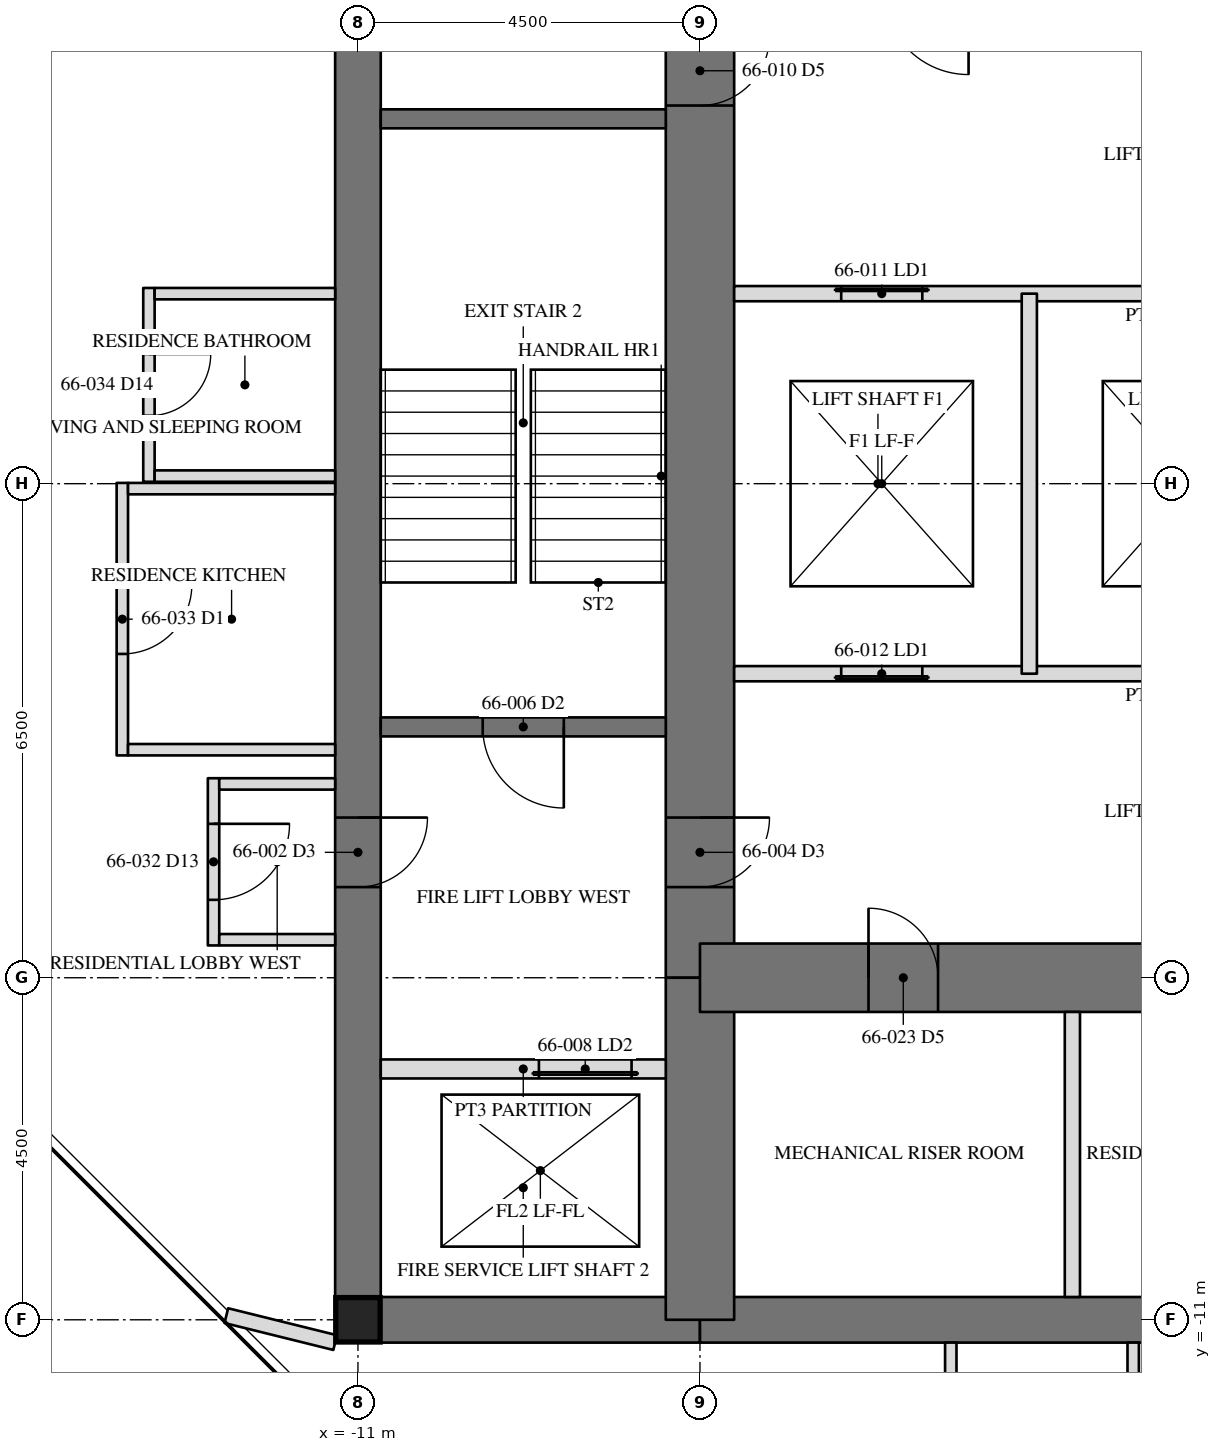
"""IFC4 building model, lengths in metres.
Left out: names, types, materials, properties, quantities, classifications, styles, units other than length and angle.
Written with IfcOpenShell. Run it as: python <this file> out.ifc"""

import sys

from ifc_helpers import new_model, si_unit, direction, frame, frame_2d, origin, origin_2d, place, context, subcontext, project, spatial, rectangle, hollow_rectangle, extrude, element, fill, save


model = new_model("IFC4")
c1 = context("Model", 3, precision=1e-05, world=origin(), true_north=direction((0.0, 1.0)))
c2 = subcontext(c1, "Body", "Model", "MODEL_VIEW")
j1 = project(units=[si_unit("LENGTHUNIT", "METRE"), si_unit("PLANEANGLEUNIT", "RADIAN")], contexts=[c1])
p1 = place(None, origin())
s1 = spatial("IfcSite", under=j1, at=p1, CompositionType="ELEMENT")
p2 = place(p1, origin())
s2 = spatial("IfcBuilding", under=s1, at=p2, CompositionType="ELEMENT")
p3 = place(p2, frame((0.0, 0.0, 270.4)))
s3 = spatial("IfcBuildingStorey", under=s2, at=p3, CompositionType="ELEMENT", Elevation=270.4)
p4 = place(p3, frame((-11.0, 11.0, 0.0), z_axis=(0.0, 0.0, 1.0), x_axis=(0.0, -1.0, 0.0)))
e1 = element("IfcWall", 1, at=p4, inside=s3, PredefinedType="SHEAR", context=c2, shape_type="SweptSolid", body=[
    extrude(rectangle(XDim=22.0, YDim=0.6, at=frame_2d((11.0, 0.0))), origin(), (0.0, 0.0, 1.0), 3.6),
])
p5 = place(p4, frame((15.393, 0.0, 0.0)))
e2 = element("IfcOpeningElement", 2, at=p5, cuts=e1, PredefinedType="OPENING", context=c2, shape_type="SweptSolid", body=[
    extrude(rectangle(XDim=0.915, YDim=2.134, at=frame_2d((0.458, 1.067))), frame((0.0, 0.31, 0.0), z_axis=(0.0, -1.0, 0.0), x_axis=(1.0, 0.0, 0.0)), (0.0, 0.0, 1.0), 0.62),
])
p6 = place(p3, frame((-11.0, -11.0, 0.0), z_axis=(0.0, 0.0, 1.0), x_axis=(1.0, 0.0, 0.0)))
e3 = element("IfcWall", 3, at=p6, inside=s3, PredefinedType="SHEAR", context=c2, shape_type="SweptSolid", body=[
    extrude(rectangle(XDim=4.5, YDim=0.6, at=frame_2d((2.25, 0.0))), origin(), (0.0, 0.0, 1.0), 3.6),
])
p7 = place(p3, frame((-6.5, -11.0, 0.0), z_axis=(0.0, 0.0, 1.0), x_axis=(1.0, 0.0, 0.0)))
e4 = element("IfcWall", 4, at=p7, inside=s3, PredefinedType="SHEAR", context=c2, shape_type="SweptSolid", body=[
    extrude(rectangle(XDim=13.0, YDim=0.6, at=frame_2d((6.5, 0.0))), origin(), (0.0, 0.0, 1.0), 3.6),
])
p8 = place(p7, frame((6.0, 0.0, 0.0)))
e5 = element("IfcOpeningElement", 5, at=p8, cuts=e4, PredefinedType="OPENING", context=c2, shape_type="SweptSolid", body=[
    extrude(rectangle(XDim=1.0, YDim=2.134, at=frame_2d((0.5, 1.067))), frame((0.0, 0.31, 0.0), z_axis=(0.0, -1.0, 0.0), x_axis=(1.0, 0.0, 0.0)), (0.0, 0.0, 1.0), 0.62),
])
p9 = place(p3, frame((-6.5, 6.5, 0.0), z_axis=(0.0, 0.0, 1.0), x_axis=(0.0, -1.0, 0.0)))
e6 = element("IfcWall", 6, at=p9, inside=s3, PredefinedType="SHEAR", context=c2, shape_type="SweptSolid", body=[
    extrude(rectangle(XDim=13.0, YDim=0.9, at=frame_2d((6.5, 0.0))), origin(), (0.0, 0.0, 1.0), 3.6),
])
p10 = place(p9, frame((10.893, 0.0, 0.0)))
e7 = element("IfcOpeningElement", 7, at=p10, cuts=e6, PredefinedType="OPENING", context=c2, shape_type="SweptSolid", body=[
    extrude(rectangle(XDim=0.915, YDim=2.134, at=frame_2d((0.458, 1.067))), frame((0.0, 0.46, 0.0), z_axis=(0.0, -1.0, 0.0), x_axis=(1.0, 0.0, 0.0)), (0.0, 0.0, 1.0), 0.92),
])
p11 = place(p9, frame((0.61, 0.0, 0.0)))
e8 = element("IfcOpeningElement", 8, at=p11, cuts=e6, PredefinedType="OPENING", context=c2, shape_type="SweptSolid", body=[
    extrude(rectangle(XDim=0.915, YDim=2.134, at=frame_2d((0.458, 1.067))), frame((0.0, 0.46, 0.0), z_axis=(0.0, -1.0, 0.0), x_axis=(1.0, 0.0, 0.0)), (0.0, 0.0, 1.0), 0.92),
])
p12 = place(p3, frame((-6.5, -6.5, 0.0), z_axis=(0.0, 0.0, 1.0), x_axis=(0.0, -1.0, 0.0)))
e9 = element("IfcWall", 9, at=p12, inside=s3, PredefinedType="SHEAR", context=c2, shape_type="SweptSolid", body=[
    extrude(rectangle(XDim=4.5, YDim=0.9, at=frame_2d((2.25, 0.0))), origin(), (0.0, 0.0, 1.0), 3.6),
])
p13 = place(p3, frame((-6.5, -6.5, 0.0), z_axis=(0.0, 0.0, 1.0), x_axis=(1.0, 0.0, 0.0)))
e10 = element("IfcWall", 10, at=p13, inside=s3, PredefinedType="SHEAR", context=c2, shape_type="SweptSolid", body=[
    extrude(rectangle(XDim=13.0, YDim=0.9, at=frame_2d((6.5, 0.0))), origin(), (0.0, 0.0, 1.0), 3.6),
])
p14 = place(p13, frame((6.042, 0.0, 0.0)))
e11 = element("IfcOpeningElement", 11, at=p14, cuts=e10, PredefinedType="OPENING", context=c2, shape_type="SweptSolid", body=[
    extrude(rectangle(XDim=0.915, YDim=2.134, at=frame_2d((0.458, 1.067))), frame((0.0, 0.46, 0.0), z_axis=(0.0, -1.0, 0.0), x_axis=(1.0, 0.0, 0.0)), (0.0, 0.0, 1.0), 0.92),
])
p15 = place(p13, frame((2.218, 0.0, 0.0)))
e12 = element("IfcOpeningElement", 12, at=p15, cuts=e10, PredefinedType="OPENING", context=c2, shape_type="SweptSolid", body=[
    extrude(rectangle(XDim=0.915, YDim=2.134, at=frame_2d((0.458, 1.067))), frame((0.0, 0.46, 0.0), z_axis=(0.0, -1.0, 0.0), x_axis=(1.0, 0.0, 0.0)), (0.0, 0.0, 1.0), 0.92),
])
p16 = place(p13, frame((9.867, 0.0, 0.0)))
e13 = element("IfcOpeningElement", 13, at=p16, cuts=e10, PredefinedType="OPENING", context=c2, shape_type="SweptSolid", body=[
    extrude(rectangle(XDim=0.915, YDim=2.134, at=frame_2d((0.458, 1.067))), frame((0.0, 0.46, 0.0), z_axis=(0.0, -1.0, 0.0), x_axis=(1.0, 0.0, 0.0)), (0.0, 0.0, 1.0), 0.92),
])
p17 = place(p3, frame((-11.0, -11.0, 0.0), z_axis=(0.0, 0.0, 1.0), x_axis=(1.0, 0.0, 0.0)))
e14 = element("IfcColumn", 14, at=p17, inside=s3, PredefinedType="COLUMN", context=c2, shape_type="SweptSolid", body=[
    extrude(hollow_rectangle(XDim=0.584, YDim=0.584, WallThickness=0.051, at=origin_2d()), origin(), (0.0, 0.0, 1.0), 3.6),
])
p18 = place(p3, frame((-6.95, 4.8, 0.0), z_axis=(0.0, 0.0, 1.0), x_axis=(-1.0, 0.0, 0.0)))
e15 = element("IfcWall", 15, at=p18, inside=s3, PredefinedType="SOLIDWALL", context=c2, shape_type="SweptSolid", body=[
    extrude(rectangle(XDim=3.75, YDim=0.25, at=frame_2d((1.875, 0.0))), origin(), (0.0, 0.0, 1.0), 3.41),
])
p19 = place(p3, frame((-6.95, -3.2, 0.0), z_axis=(0.0, 0.0, 1.0), x_axis=(-1.0, 0.0, 0.0)))
e16 = element("IfcWall", 16, at=p19, inside=s3, PredefinedType="SOLIDWALL", context=c2, shape_type="SweptSolid", body=[
    extrude(rectangle(XDim=3.75, YDim=0.25, at=frame_2d((1.875, 0.0))), origin(), (0.0, 0.0, 1.0), 3.41),
])
p20 = place(p19, frame((1.342, 0.0, 0.0)))
e17 = element("IfcOpeningElement", 17, at=p20, cuts=e16, PredefinedType="OPENING", context=c2, shape_type="SweptSolid", body=[
    extrude(rectangle(XDim=1.067, YDim=2.134, at=frame_2d((0.533, 1.067))), frame((0.0, 0.135, 0.0), z_axis=(0.0, -1.0, 0.0), x_axis=(1.0, 0.0, 0.0)), (0.0, 0.0, 1.0), 0.27),
])
p21 = place(p3, frame((-6.95, -7.7, 0.0), z_axis=(0.0, 0.0, 1.0), x_axis=(-1.0, 0.0, 0.0)))
e18 = element("IfcWall", 18, at=p21, inside=s3, PredefinedType="PARTITIONING", context=c2, shape_type="SweptSolid", body=[
    extrude(rectangle(XDim=3.75, YDim=0.25, at=frame_2d((1.875, 0.0))), origin(), (0.0, 0.0, 1.0), 3.41),
])
p22 = place(p21, frame((0.45, 0.0, 0.0)))
e19 = element("IfcOpeningElement", 19, at=p22, cuts=e18, PredefinedType="OPENING", context=c2, shape_type="SweptSolid", body=[
    extrude(rectangle(XDim=1.219, YDim=2.134, at=frame_2d((0.609, 1.067))), frame((0.0, 0.135, 0.0), z_axis=(0.0, -1.0, 0.0), x_axis=(1.0, 0.0, 0.0)), (0.0, 0.0, 1.0), 0.27),
])
p23 = place(p3, frame((-6.05, 2.5, 0.0), z_axis=(0.0, 0.0, 1.0), x_axis=(1.0, 0.0, 0.0)))
e20 = element("IfcWall", 20, at=p23, inside=s3, PredefinedType="PARTITIONING", context=c2, shape_type="SweptSolid", body=[
    extrude(rectangle(XDim=12.1, YDim=0.2, at=frame_2d((6.05, 0.0))), origin(), (0.0, 0.0, 1.0), 3.41),
])
p24 = place(p23, frame((1.408, 0.0, 0.0)))
e21 = element("IfcOpeningElement", 21, at=p24, cuts=e20, PredefinedType="OPENING", context=c2, shape_type="SweptSolid", body=[
    extrude(rectangle(XDim=1.067, YDim=2.134, at=frame_2d((0.533, 1.067))), frame((0.0, 0.11, 0.0), z_axis=(0.0, -1.0, 0.0), x_axis=(1.0, 0.0, 0.0)), (0.0, 0.0, 1.0), 0.22),
])
p25 = place(p23, frame((5.517, 0.0, 0.0)))
e22 = element("IfcOpeningElement", 22, at=p25, cuts=e20, PredefinedType="OPENING", context=c2, shape_type="SweptSolid", body=[
    extrude(rectangle(XDim=1.067, YDim=2.134, at=frame_2d((0.533, 1.067))), frame((0.0, 0.11, 0.0), z_axis=(0.0, -1.0, 0.0), x_axis=(1.0, 0.0, 0.0)), (0.0, 0.0, 1.0), 0.22),
])
p26 = place(p23, frame((9.625, 0.0, 0.0)))
e23 = element("IfcOpeningElement", 23, at=p26, cuts=e20, PredefinedType="OPENING", context=c2, shape_type="SweptSolid", body=[
    extrude(rectangle(XDim=1.067, YDim=2.134, at=frame_2d((0.533, 1.067))), frame((0.0, 0.11, 0.0), z_axis=(0.0, -1.0, 0.0), x_axis=(1.0, 0.0, 0.0)), (0.0, 0.0, 1.0), 0.22),
])
p27 = place(p3, frame((6.05, -2.5, 0.0), z_axis=(0.0, 0.0, 1.0), x_axis=(-1.0, 0.0, 0.0)))
e24 = element("IfcWall", 24, at=p27, inside=s3, PredefinedType="PARTITIONING", context=c2, shape_type="SweptSolid", body=[
    extrude(rectangle(XDim=12.1, YDim=0.2, at=frame_2d((6.05, 0.0))), origin(), (0.0, 0.0, 1.0), 3.41),
])
p28 = place(p27, frame((9.625, 0.0, 0.0)))
e25 = element("IfcOpeningElement", 25, at=p28, cuts=e24, PredefinedType="OPENING", context=c2, shape_type="SweptSolid", body=[
    extrude(rectangle(XDim=1.067, YDim=2.134, at=frame_2d((0.533, 1.067))), frame((0.0, 0.11, 0.0), z_axis=(0.0, -1.0, 0.0), x_axis=(1.0, 0.0, 0.0)), (0.0, 0.0, 1.0), 0.22),
])
p29 = place(p27, frame((5.517, 0.0, 0.0)))
e26 = element("IfcOpeningElement", 26, at=p29, cuts=e24, PredefinedType="OPENING", context=c2, shape_type="SweptSolid", body=[
    extrude(rectangle(XDim=1.067, YDim=2.134, at=frame_2d((0.533, 1.067))), frame((0.0, 0.11, 0.0), z_axis=(0.0, -1.0, 0.0), x_axis=(1.0, 0.0, 0.0)), (0.0, 0.0, 1.0), 0.22),
])
p30 = place(p27, frame((1.408, 0.0, 0.0)))
e27 = element("IfcOpeningElement", 27, at=p30, cuts=e24, PredefinedType="OPENING", context=c2, shape_type="SweptSolid", body=[
    extrude(rectangle(XDim=1.067, YDim=2.134, at=frame_2d((0.533, 1.067))), frame((0.0, 0.11, 0.0), z_axis=(0.0, -1.0, 0.0), x_axis=(1.0, 0.0, 0.0)), (0.0, 0.0, 1.0), 0.22),
])
p31 = place(p3, frame((-2.167, -2.5, 0.0), z_axis=(0.0, 0.0, 1.0), x_axis=(0.0, 1.0, 0.0)))
e28 = element("IfcWall", 28, at=p31, inside=s3, PredefinedType="PARTITIONING", context=c2, shape_type="SweptSolid", body=[
    extrude(rectangle(XDim=5.0, YDim=0.2, at=frame_2d((2.5, 0.0))), origin(), (0.0, 0.0, 1.0), 3.41),
])
p32 = place(p3, frame((-1.6, -6.95, 0.0), z_axis=(0.0, 0.0, 1.0), x_axis=(0.0, -1.0, 0.0)))
e29 = element("IfcWall", 29, at=p32, inside=s3, PredefinedType="PARTITIONING", context=c2, shape_type="SweptSolid", body=[
    extrude(rectangle(XDim=3.75, YDim=0.2, at=frame_2d((1.875, 0.0))), origin(), (0.0, 0.0, 1.0), 3.41),
])
p33 = place(p3, frame((-11.3, -11.3, 0.0), z_axis=(0.0, 0.0, 1.0), x_axis=(-0.970646702169, 0.24050983258, 0.0)))
e30 = element("IfcWall", 30, at=p33, inside=s3, PredefinedType="PARTITIONING", context=c2, shape_type="SweptSolid", body=[
    extrude(rectangle(XDim=1.475, YDim=0.2, at=frame_2d((0.737, 0.0))), origin(), (0.0, 0.0, 1.0), 3.41),
])
p34 = place(p3, frame((-12.9, -3.875, 0.0), z_axis=(0.0, 0.0, 1.0), x_axis=(0.0, -1.0, 0.0)))
e31 = element("IfcWall", 31, at=p34, inside=s3, PredefinedType="PARTITIONING", context=c2, shape_type="SweptSolid", body=[
    extrude(rectangle(XDim=2.2, YDim=0.15, at=frame_2d((1.1, 0.0))), origin(), (0.0, 0.0, 1.0), 3.41),
])
p35 = place(p34, frame((0.6, 0.0, 0.0)))
e32 = element("IfcOpeningElement", 32, at=p35, cuts=e31, PredefinedType="OPENING", context=c2, shape_type="SweptSolid", body=[
    extrude(rectangle(XDim=1.0, YDim=2.134, at=frame_2d((0.5, 1.067))), frame((0.0, 0.085, 0.0), z_axis=(0.0, -1.0, 0.0), x_axis=(1.0, 0.0, 0.0)), (0.0, 0.0, 1.0), 0.17),
])
for number, where, z_axis, x_axis in (
    (33, (-11.3, -3.95, 0.0), (0.0, 0.0, 1.0), (-1.0, 0.0, 0.0)),
    (34, (-11.3, -6.0, 0.0), (0.0, 0.0, 1.0), (-1.0, 0.0, 0.0)),
):
    element("IfcWall", number, at=place(p3, frame(where, z_axis=z_axis, x_axis=x_axis)), inside=s3, PredefinedType="PARTITIONING", context=c2, shape_type="SweptSolid", body=[
        extrude(rectangle(XDim=1.525, YDim=0.15, at=frame_2d((0.762, 0.0))), origin(), (0.0, 0.0, 1.0), 3.41),
    ])
p36 = place(p3, frame((-14.1, 0.01, 0.0), z_axis=(0.0, 0.0, 1.0), x_axis=(0.0, -1.0, 0.0)))
e35 = element("IfcWall", 35, at=p36, inside=s3, PredefinedType="PARTITIONING", context=c2, shape_type="SweptSolid", body=[
    extrude(rectangle(XDim=3.585, YDim=0.15, at=frame_2d((1.792, 0.0))), origin(), (0.0, 0.0, 1.0), 3.41),
])
p37 = place(p36, frame((1.335, 0.0, 0.0)))
e36 = element("IfcOpeningElement", 36, at=p37, cuts=e35, PredefinedType="OPENING", context=c2, shape_type="SweptSolid", body=[
    extrude(rectangle(XDim=0.915, YDim=2.134, at=frame_2d((0.458, 1.067))), frame((0.0, 0.085, 0.0), z_axis=(0.0, -1.0, 0.0), x_axis=(1.0, 0.0, 0.0)), (0.0, 0.0, 1.0), 0.17),
])
p38 = place(p3, frame((-11.3, -0.065, 0.0), z_axis=(0.0, 0.0, 1.0), x_axis=(-1.0, 0.0, 0.0)))
e37 = element("IfcWall", 37, at=p38, inside=s3, PredefinedType="PARTITIONING", context=c2, shape_type="SweptSolid", body=[
    extrude(rectangle(XDim=2.725, YDim=0.15, at=frame_2d((1.362, 0.0))), origin(), (0.0, 0.0, 1.0), 2.709),
])
p39 = place(p3, frame((-11.3, -3.5, 0.0), z_axis=(0.0, 0.0, 1.0), x_axis=(-1.0, 0.0, 0.0)))
e38 = element("IfcWall", 38, at=p39, inside=s3, PredefinedType="PARTITIONING", context=c2, shape_type="SweptSolid", body=[
    extrude(rectangle(XDim=2.725, YDim=0.15, at=frame_2d((1.362, 0.0))), origin(), (0.0, 0.0, 1.0), 3.41),
])
p40 = place(p3, frame((-13.75, 2.575, 0.0), z_axis=(0.0, 0.0, 1.0), x_axis=(0.0, -1.0, 0.0)))
e39 = element("IfcWall", 39, at=p40, inside=s3, PredefinedType="PARTITIONING", context=c2, shape_type="SweptSolid", body=[
    extrude(rectangle(XDim=2.55, YDim=0.15, at=frame_2d((1.275, 0.0))), origin(), (0.0, 0.0, 1.0), 3.41),
])
p41 = place(p40, frame((0.868, 0.0, 0.0)))
e40 = element("IfcOpeningElement", 40, at=p41, cuts=e39, PredefinedType="OPENING", context=c2, shape_type="SweptSolid", body=[
    extrude(rectangle(XDim=0.813, YDim=2.032, at=frame_2d((0.406, 1.016))), frame((0.0, 0.085, 0.0), z_axis=(0.0, -1.0, 0.0), x_axis=(1.0, 0.0, 0.0)), (0.0, 0.0, 1.0), 0.17),
])
p42 = place(p3, frame((-11.3, 2.5, 0.0), z_axis=(0.0, 0.0, 1.0), x_axis=(-1.0, 0.0, 0.0)))
e41 = element("IfcWall", 41, at=p42, inside=s3, PredefinedType="PARTITIONING", context=c2, shape_type="SweptSolid", body=[
    extrude(rectangle(XDim=2.375, YDim=0.15, at=frame_2d((1.188, 0.0))), origin(), (0.0, 0.0, 1.0), 3.41),
])
for number, where, z_axis, x_axis in (
    (42, (-11.3, 0.1, 0.0), (0.0, 0.0, 1.0), (-1.0, 0.0, 0.0)),
    (43, (-3.2, -11.3, 0.0), (0.0, 0.0, 1.0), (0.0, -1.0, 0.0)),
):
    element("IfcWall", number, at=place(p3, frame(where, z_axis=z_axis, x_axis=x_axis)), inside=s3, PredefinedType="PARTITIONING", context=c2, shape_type="SweptSolid", body=[
        extrude(rectangle(XDim=2.375, YDim=0.15, at=frame_2d((1.188, 0.0))), origin(), (0.0, 0.0, 1.0), 2.709),
    ])
p43 = place(p3, frame((-0.8, -11.3, 0.0), z_axis=(0.0, 0.0, 1.0), x_axis=(0.0, -1.0, 0.0)))
e44 = element("IfcWall", 44, at=p43, inside=s3, PredefinedType="PARTITIONING", context=c2, shape_type="SweptSolid", body=[
    extrude(rectangle(XDim=2.375, YDim=0.15, at=frame_2d((1.188, 0.0))), origin(), (0.0, 0.0, 1.0), 3.41),
])
p44 = place(p5, origin())
e45 = element("IfcDoor", 45, at=p44, inside=s3, OperationType="SINGLE_SWING_RIGHT", PredefinedType="DOOR", context=c2, shape_type="SweptSolid", body=[
    extrude(rectangle(XDim=0.915, YDim=2.134, at=frame_2d((0.458, 1.067))), frame((0.0, -0.225, 0.0), z_axis=(0.0, -1.0, 0.0), x_axis=(1.0, 0.0, 0.0)), (0.0, 0.0, 1.0), 0.05),
])
fill(e2, e45)
p45 = place(p10, origin())
e46 = element("IfcDoor", 46, at=p45, inside=s3, OperationType="SINGLE_SWING_RIGHT", PredefinedType="DOOR", context=c2, shape_type="SweptSolid", body=[
    extrude(rectangle(XDim=0.915, YDim=2.134, at=frame_2d((0.458, 1.067))), frame((0.0, -0.375, 0.0), z_axis=(0.0, -1.0, 0.0), x_axis=(1.0, 0.0, 0.0)), (0.0, 0.0, 1.0), 0.05),
])
fill(e7, e46)
p46 = place(p20, origin())
e47 = element("IfcDoor", 47, at=p46, inside=s3, OperationType="SINGLE_SWING_LEFT", PredefinedType="DOOR", context=c2, shape_type="SweptSolid", body=[
    extrude(rectangle(XDim=1.067, YDim=2.134, at=frame_2d((0.533, 1.067))), frame((0.0, 0.025, 0.0), z_axis=(0.0, -1.0, 0.0), x_axis=(1.0, 0.0, 0.0)), (0.0, 0.0, 1.0), 0.05),
])
fill(e17, e47)
p47 = place(p22, origin())
e48 = element("IfcDoor", 48, at=p47, inside=s3, OperationType="SLIDING_TO_LEFT", PredefinedType="DOOR", context=c2, shape_type="SweptSolid", body=[
    extrude(rectangle(XDim=1.219, YDim=2.134, at=frame_2d((0.609, 1.067))), frame((0.0, 0.025, 0.0), z_axis=(0.0, -1.0, 0.0), x_axis=(1.0, 0.0, 0.0)), (0.0, 0.0, 1.0), 0.05),
])
fill(e19, e48)
p48 = place(p11, origin())
e49 = element("IfcDoor", 49, at=p48, inside=s3, OperationType="SINGLE_SWING_RIGHT", PredefinedType="DOOR", context=c2, shape_type="SweptSolid", body=[
    extrude(rectangle(XDim=0.915, YDim=2.134, at=frame_2d((0.458, 1.067))), frame((0.0, -0.375, 0.0), z_axis=(0.0, -1.0, 0.0), x_axis=(1.0, 0.0, 0.0)), (0.0, 0.0, 1.0), 0.05),
])
fill(e8, e49)
p49 = place(p24, origin())
e50 = element("IfcDoor", 50, at=p49, inside=s3, OperationType="SLIDING_TO_LEFT", PredefinedType="DOOR", context=c2, shape_type="SweptSolid", body=[
    extrude(rectangle(XDim=1.067, YDim=2.134, at=frame_2d((0.533, 1.067))), frame((0.0, 0.025, 0.0), z_axis=(0.0, -1.0, 0.0), x_axis=(1.0, 0.0, 0.0)), (0.0, 0.0, 1.0), 0.05),
])
fill(e21, e50)
p50 = place(p28, origin())
e51 = element("IfcDoor", 51, at=p50, inside=s3, OperationType="SLIDING_TO_LEFT", PredefinedType="DOOR", context=c2, shape_type="SweptSolid", body=[
    extrude(rectangle(XDim=1.067, YDim=2.134, at=frame_2d((0.533, 1.067))), frame((0.0, 0.025, 0.0), z_axis=(0.0, -1.0, 0.0), x_axis=(1.0, 0.0, 0.0)), (0.0, 0.0, 1.0), 0.05),
])
fill(e25, e51)
p51 = place(p15, origin())
e52 = element("IfcDoor", 52, at=p51, inside=s3, OperationType="SINGLE_SWING_RIGHT", PredefinedType="DOOR", context=c2, shape_type="SweptSolid", body=[
    extrude(rectangle(XDim=0.915, YDim=2.134, at=frame_2d((0.458, 1.067))), frame((0.0, -0.375, 0.0), z_axis=(0.0, -1.0, 0.0), x_axis=(1.0, 0.0, 0.0)), (0.0, 0.0, 1.0), 0.05),
])
fill(e12, e52)
p52 = place(p35, origin())
e53 = element("IfcDoor", 53, at=p52, inside=s3, OperationType="SINGLE_SWING_RIGHT", PredefinedType="DOOR", context=c2, shape_type="SweptSolid", body=[
    extrude(rectangle(XDim=1.0, YDim=2.134, at=frame_2d((0.5, 1.067))), frame((0.0, 0.025, 0.0), z_axis=(0.0, -1.0, 0.0), x_axis=(1.0, 0.0, 0.0)), (0.0, 0.0, 1.0), 0.05),
])
fill(e32, e53)
p53 = place(p37, origin())
e54 = element("IfcDoor", 54, at=p53, inside=s3, OperationType="SINGLE_SWING_LEFT", PredefinedType="DOOR", context=c2, shape_type="SweptSolid", body=[
    extrude(rectangle(XDim=0.915, YDim=2.134, at=frame_2d((0.458, 1.067))), frame((0.0, 0.025, 0.0), z_axis=(0.0, -1.0, 0.0), x_axis=(1.0, 0.0, 0.0)), (0.0, 0.0, 1.0), 0.05),
])
fill(e36, e54)
p54 = place(p41, origin())
e55 = element("IfcDoor", 55, at=p54, inside=s3, OperationType="SINGLE_SWING_LEFT", PredefinedType="DOOR", context=c2, shape_type="SweptSolid", body=[
    extrude(rectangle(XDim=0.813, YDim=2.032, at=frame_2d((0.406, 1.016))), frame((0.0, 0.025, 0.0), z_axis=(0.0, -1.0, 0.0), x_axis=(1.0, 0.0, 0.0)), (0.0, 0.0, 1.0), 0.05),
])
fill(e40, e55)
save(model, sys.argv[1])
